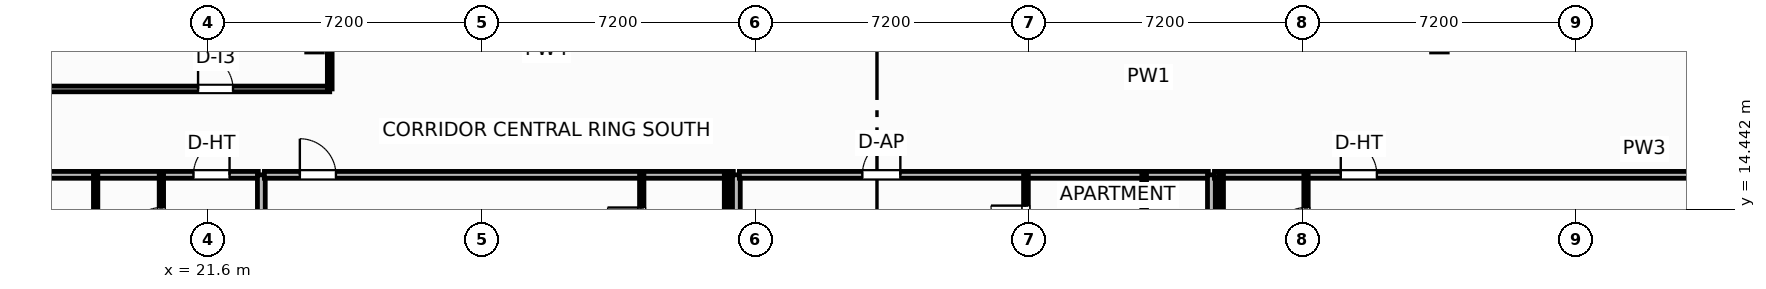
"""IFC4 building model, lengths in metres.
Left out: names, types, materials, properties, quantities, classifications, styles, units other than length and angle.
Written with IfcOpenShell. Run it as: python <this file> out.ifc"""

import sys

from ifc_helpers import new_model, si_unit, direction, frame, frame_2d, origin, place, context, subcontext, project, spatial, rectangle, extrude, element, fill, save


model = new_model("IFC4")
c1 = context("Model", 3, precision=1e-05, world=origin(), true_north=direction((0.0, 1.0)))
c2 = subcontext(c1, "Body", "Model", "MODEL_VIEW")
j1 = project(units=[si_unit("LENGTHUNIT", "METRE"), si_unit("PLANEANGLEUNIT", "RADIAN")], contexts=[c1])
p1 = place(None, origin())
s1 = spatial("IfcSite", under=j1, at=p1, CompositionType="ELEMENT")
p2 = place(p1, origin())
s2 = spatial("IfcBuilding", under=s1, at=p2, CompositionType="ELEMENT")
p3 = place(p2, frame((0.0, 0.0, 223.8)))
s3 = spatial("IfcBuildingStorey", under=s2, at=p3, CompositionType="ELEMENT", Elevation=223.8)
p4 = place(p3, frame((56.219, 9.845, 0.0), z_axis=(0.0, 0.0, 1.0), x_axis=(0.935225601791, 0.354052360188, 0.0)))
e1 = element("IfcWall", 1, at=p4, inside=s3, PredefinedType="SOLIDWALL", context=c2, shape_type="SweptSolid", body=[
    extrude(rectangle(XDim=17.647, YDim=0.22, at=frame_2d((8.824, 0.0))), origin(), (0.0, 0.0, 1.0), 2.73),
])
p5 = place(p4, frame((7.774, 0.0, 0.8)))
e2 = element("IfcOpeningElement", 2, at=p5, cuts=e1, PredefinedType="OPENING", context=c2, shape_type="SweptSolid", body=[
    extrude(rectangle(XDim=2.1, YDim=1.75, at=frame_2d((1.05, 0.875))), frame((0.0, 0.12, 0.0), z_axis=(0.0, -1.0, 0.0), x_axis=(1.0, 0.0, 0.0)), (0.0, 0.0, 1.0), 0.24),
])
p6 = place(p3, frame((6.908, 17.61, 0.0), z_axis=(0.0, 0.0, 1.0), x_axis=(1.0, 0.0, 0.0)))
e3 = element("IfcWall", 3, at=p6, inside=s3, PredefinedType="PARTITIONING", context=c2, shape_type="SweptSolid", body=[
    extrude(rectangle(XDim=17.892, YDim=0.15, at=frame_2d((8.946, 0.0))), origin(), (0.0, 0.0, 1.0), 3.45),
])
p7 = place(p6, frame((14.427, 0.0, 0.0)))
e4 = element("IfcOpeningElement", 4, at=p7, cuts=e3, PredefinedType="OPENING", context=c2, shape_type="SweptSolid", body=[
    extrude(rectangle(XDim=0.92, YDim=2.05, at=frame_2d((0.46, 1.025))), frame((0.0, 0.085, 0.0), z_axis=(0.0, -1.0, 0.0), x_axis=(1.0, 0.0, 0.0)), (0.0, 0.0, 1.0), 0.17),
])
p8 = place(p3, frame((24.8, 17.61, 0.0), z_axis=(0.0, 0.0, 1.0), x_axis=(0.0, 1.0, 0.0)))
e5 = element("IfcWall", 5, at=p8, inside=s3, PredefinedType="PARTITIONING", context=c2, shape_type="SweptSolid", body=[
    extrude(rectangle(XDim=1.63, YDim=0.125, at=frame_2d((0.815, 0.0))), origin(), (0.0, 0.0, 1.0), 2.739),
])
p9 = place(p3, frame((7.764, 15.35, 0.0), z_axis=(0.0, 0.0, 1.0), x_axis=(1.0, 0.0, 0.0)))
e6 = element("IfcWall", 6, at=p9, inside=s3, PredefinedType="PARTITIONING", context=c2, shape_type="SweptSolid", body=[
    extrude(rectangle(XDim=15.156, YDim=0.18, at=frame_2d((7.578, 0.0))), origin(), (0.0, 0.0, 1.0), 3.45),
])
p10 = place(p9, frame((13.45, 0.0, 0.0)))
e7 = element("IfcOpeningElement", 7, at=p10, cuts=e6, PredefinedType="OPENING", context=c2, shape_type="SweptSolid", body=[
    extrude(rectangle(XDim=0.95, YDim=2.15, at=frame_2d((0.475, 1.075))), frame((0.0, 0.1, 0.0), z_axis=(0.0, -1.0, 0.0), x_axis=(1.0, 0.0, 0.0)), (0.0, 0.0, 1.0), 0.2),
])
p11 = place(p3, frame((20.37, 12.83, 0.0), z_axis=(0.0, 0.0, 1.0), x_axis=(0.0, 1.0, 0.0)))
e8 = element("IfcWall", 8, at=p11, inside=s3, PredefinedType="PARTITIONING", context=c2, shape_type="SweptSolid", body=[
    extrude(rectangle(XDim=2.52, YDim=0.115, at=frame_2d((1.26, 0.0))), origin(), (0.0, 0.0, 1.0), 3.45),
])
p12 = place(p11, frame((0.76, 0.0, 0.0)))
e9 = element("IfcOpeningElement", 9, at=p12, cuts=e8, PredefinedType="OPENING", context=c2, shape_type="SweptSolid", body=[
    extrude(rectangle(XDim=0.9, YDim=2.05, at=frame_2d((0.45, 1.025))), frame((0.0, 0.067, 0.0), z_axis=(0.0, -1.0, 0.0), x_axis=(1.0, 0.0, 0.0)), (0.0, 0.0, 1.0), 0.135),
])
p13 = place(p3, frame((18.64, 12.83, 0.0), z_axis=(0.0, 0.0, 1.0), x_axis=(0.0, 1.0, 0.0)))
e10 = element("IfcWall", 10, at=p13, inside=s3, PredefinedType="PARTITIONING", context=c2, shape_type="SweptSolid", body=[
    extrude(rectangle(XDim=2.52, YDim=0.115, at=frame_2d((1.26, 0.0))), origin(), (0.0, 0.0, 1.0), 3.45),
])
p14 = place(p3, frame((23.0, -2.71, 0.0), z_axis=(0.0, 0.0, 1.0), x_axis=(0.0, 1.0, 0.0)))
e11 = element("IfcWall", 11, at=p14, inside=s3, PredefinedType="PARTITIONING", context=c2, shape_type="SweptSolid", body=[
    extrude(rectangle(XDim=18.06, YDim=0.205, at=frame_2d((9.03, 0.0))), origin(), (0.0, 0.0, 1.0), 3.45),
])
p15 = place(p3, frame((23.08, 15.35, 0.0), z_axis=(0.0, 0.0, 1.0), x_axis=(1.0, 0.0, 0.0)))
e12 = element("IfcWall", 12, at=p15, inside=s3, PredefinedType="PARTITIONING", context=c2, shape_type="SweptSolid", body=[
    extrude(rectangle(XDim=12.34, YDim=0.18, at=frame_2d((6.17, 0.0))), origin(), (0.0, 0.0, 1.0), 3.45),
])
p16 = place(p15, frame((0.933, 0.0, 0.0)))
e13 = element("IfcOpeningElement", 13, at=p16, cuts=e12, PredefinedType="OPENING", context=c2, shape_type="SweptSolid", body=[
    extrude(rectangle(XDim=0.95, YDim=2.15, at=frame_2d((0.475, 1.075))), frame((0.0, 0.1, 0.0), z_axis=(0.0, -1.0, 0.0), x_axis=(1.0, 0.0, 0.0)), (0.0, 0.0, 1.0), 0.2),
])
p17 = place(p3, frame((33.01, 12.83, 0.0), z_axis=(0.0, 0.0, 1.0), x_axis=(0.0, 1.0, 0.0)))
e14 = element("IfcWall", 14, at=p17, inside=s3, PredefinedType="PARTITIONING", context=c2, shape_type="SweptSolid", body=[
    extrude(rectangle(XDim=2.52, YDim=0.115, at=frame_2d((1.26, 0.0))), origin(), (0.0, 0.0, 1.0), 3.45),
])
p18 = place(p17, frame((0.76, 0.0, 0.0)))
e15 = element("IfcOpeningElement", 15, at=p18, cuts=e14, PredefinedType="OPENING", context=c2, shape_type="SweptSolid", body=[
    extrude(rectangle(XDim=0.9, YDim=2.05, at=frame_2d((0.45, 1.025))), frame((0.0, 0.067, 0.0), z_axis=(0.0, -1.0, 0.0), x_axis=(1.0, 0.0, 0.0)), (0.0, 0.0, 1.0), 0.135),
])
p19 = place(p3, frame((35.24, 12.83, 0.0), z_axis=(0.0, 0.0, 1.0), x_axis=(0.0, 1.0, 0.0)))
e16 = element("IfcWall", 16, at=p19, inside=s3, PredefinedType="PARTITIONING", context=c2, shape_type="SweptSolid", body=[
    extrude(rectangle(XDim=2.52, YDim=0.115, at=frame_2d((1.26, 0.0))), origin(), (0.0, 0.0, 1.0), 2.739),
])
p20 = place(p3, frame((35.5, 2.022, 0.0), z_axis=(0.0, 0.0, 1.0), x_axis=(0.0, 1.0, 0.0)))
e17 = element("IfcWall", 17, at=p20, inside=s3, PredefinedType="PARTITIONING", context=c2, shape_type="SweptSolid", body=[
    extrude(rectangle(XDim=13.328, YDim=0.205, at=frame_2d((6.664, 0.0))), origin(), (0.0, 0.0, 1.0), 2.739),
])
p21 = place(p3, frame((35.58, 15.35, 0.0), z_axis=(0.0, 0.0, 1.0), x_axis=(1.0, 0.0, 0.0)))
e18 = element("IfcWall", 18, at=p21, inside=s3, PredefinedType="PARTITIONING", context=c2, shape_type="SweptSolid", body=[
    extrude(rectangle(XDim=12.34, YDim=0.18, at=frame_2d((6.17, 0.0))), origin(), (0.0, 0.0, 1.0), 3.45),
])
p22 = place(p21, frame((3.235, 0.0, 0.0)))
e19 = element("IfcOpeningElement", 19, at=p22, cuts=e18, PredefinedType="OPENING", context=c2, shape_type="SweptSolid", body=[
    extrude(rectangle(XDim=1.0, YDim=2.2, at=frame_2d((0.5, 1.1))), frame((0.0, 0.1, 0.0), z_axis=(0.0, -1.0, 0.0), x_axis=(1.0, 0.0, 0.0)), (0.0, 0.0, 1.0), 0.2),
])
p23 = place(p3, frame((43.12, 4.907, 0.0), z_axis=(0.0, 0.0, 1.0), x_axis=(0.0, 1.0, 0.0)))
e20 = element("IfcWall", 20, at=p23, inside=s3, PredefinedType="PARTITIONING", context=c2, shape_type="SweptSolid", body=[
    extrude(rectangle(XDim=10.443, YDim=0.125, at=frame_2d((5.222, 0.0))), origin(), (0.0, 0.0, 1.0), 3.45),
])
p24 = place(p23, frame((2.32, 0.0, 0.0)))
e21 = element("IfcOpeningElement", 21, at=p24, cuts=e20, PredefinedType="OPENING", context=c2, shape_type="SweptSolid", body=[
    extrude(rectangle(XDim=0.92, YDim=2.05, at=frame_2d((0.46, 1.025))), frame((0.0, 0.073, 0.0), z_axis=(0.0, -1.0, 0.0), x_axis=(1.0, 0.0, 0.0)), (0.0, 0.0, 1.0), 0.145),
])
p25 = place(p23, frame((6.42, 0.0, 0.0)))
e22 = element("IfcOpeningElement", 22, at=p25, cuts=e20, PredefinedType="OPENING", context=c2, shape_type="SweptSolid", body=[
    extrude(rectangle(XDim=0.9, YDim=2.05, at=frame_2d((0.45, 1.025))), frame((0.0, 0.073, 0.0), z_axis=(0.0, -1.0, 0.0), x_axis=(1.0, 0.0, 0.0)), (0.0, 0.0, 1.0), 0.145),
])
p26 = place(p23, frame((8.713, 0.0, 0.0)))
e23 = element("IfcOpeningElement", 23, at=p26, cuts=e20, PredefinedType="OPENING", context=c2, shape_type="SweptSolid", body=[
    extrude(rectangle(XDim=0.92, YDim=2.05, at=frame_2d((0.46, 1.025))), frame((0.0, 0.073, 0.0), z_axis=(0.0, -1.0, 0.0), x_axis=(1.0, 0.0, 0.0)), (0.0, 0.0, 1.0), 0.145),
])
p27 = place(p3, frame((46.23, 12.94, 0.0), z_axis=(0.0, 0.0, 1.0), x_axis=(0.0, 1.0, 0.0)))
e24 = element("IfcWall", 24, at=p27, inside=s3, PredefinedType="PARTITIONING", context=c2, shape_type="SweptSolid", body=[
    extrude(rectangle(XDim=2.41, YDim=0.125, at=frame_2d((1.205, 0.0))), origin(), (0.0, 0.0, 1.0), 3.45),
])
p28 = place(p3, frame((48.0, 6.754, 0.0), z_axis=(0.0, 0.0, 1.0), x_axis=(0.0, 1.0, 0.0)))
e25 = element("IfcWall", 25, at=p28, inside=s3, PredefinedType="PARTITIONING", context=c2, shape_type="SweptSolid", body=[
    extrude(rectangle(XDim=8.596, YDim=0.205, at=frame_2d((4.298, 0.0))), origin(), (0.0, 0.0, 1.0), 3.45),
])
p29 = place(p3, frame((48.08, 15.35, 0.0), z_axis=(0.0, 0.0, 1.0), x_axis=(1.0, 0.0, 0.0)))
e26 = element("IfcWall", 26, at=p29, inside=s3, PredefinedType="PARTITIONING", context=c2, shape_type="SweptSolid", body=[
    extrude(rectangle(XDim=22.624, YDim=0.18, at=frame_2d((11.312, 0.0))), origin(), (0.0, 0.0, 1.0), 3.45),
])
p30 = place(p29, frame((3.324, 0.0, 0.0)))
e27 = element("IfcOpeningElement", 27, at=p30, cuts=e26, PredefinedType="OPENING", context=c2, shape_type="SweptSolid", body=[
    extrude(rectangle(XDim=0.95, YDim=2.15, at=frame_2d((0.475, 1.075))), frame((0.0, 0.1, 0.0), z_axis=(0.0, -1.0, 0.0), x_axis=(1.0, 0.0, 0.0)), (0.0, 0.0, 1.0), 0.2),
])
p31 = place(p3, frame((50.49, 12.83, 0.0), z_axis=(0.0, 0.0, 1.0), x_axis=(0.0, 1.0, 0.0)))
e28 = element("IfcWall", 28, at=p31, inside=s3, PredefinedType="PARTITIONING", context=c2, shape_type="SweptSolid", body=[
    extrude(rectangle(XDim=2.52, YDim=0.115, at=frame_2d((1.26, 0.0))), origin(), (0.0, 0.0, 1.0), 3.45),
])
p32 = place(p31, frame((0.76, 0.0, 0.0)))
e29 = element("IfcOpeningElement", 29, at=p32, cuts=e28, PredefinedType="OPENING", context=c2, shape_type="SweptSolid", body=[
    extrude(rectangle(XDim=0.9, YDim=2.05, at=frame_2d((0.45, 1.025))), frame((0.0, 0.067, 0.0), z_axis=(0.0, -1.0, 0.0), x_axis=(1.0, 0.0, 0.0)), (0.0, 0.0, 1.0), 0.135),
])
p33 = place(p3, frame((48.26, 12.83, 0.0), z_axis=(0.0, 0.0, 1.0), x_axis=(0.0, 1.0, 0.0)))
e30 = element("IfcWall", 30, at=p33, inside=s3, PredefinedType="PARTITIONING", context=c2, shape_type="SweptSolid", body=[
    extrude(rectangle(XDim=2.52, YDim=0.115, at=frame_2d((1.26, 0.0))), origin(), (0.0, 0.0, 1.0), 3.45),
])
p34 = place(p7, origin())
e31 = element("IfcDoor", 31, at=p34, inside=s3, OperationType="SINGLE_SWING_LEFT", PredefinedType="DOOR", context=c2, shape_type="SweptSolid", body=[
    extrude(rectangle(XDim=0.92, YDim=2.05, at=frame_2d((0.46, 1.025))), frame((0.0, 0.025, 0.0), z_axis=(0.0, -1.0, 0.0), x_axis=(1.0, 0.0, 0.0)), (0.0, 0.0, 1.0), 0.05),
])
fill(e4, e31)
p35 = place(p10, origin())
e32 = element("IfcDoor", 32, at=p35, inside=s3, OperationType="SINGLE_SWING_RIGHT", PredefinedType="DOOR", context=c2, shape_type="SweptSolid", body=[
    extrude(rectangle(XDim=0.95, YDim=2.15, at=frame_2d((0.475, 1.075))), frame((0.0, 0.025, 0.0), z_axis=(0.0, -1.0, 0.0), x_axis=(1.0, 0.0, 0.0)), (0.0, 0.0, 1.0), 0.05),
])
fill(e7, e32)
p36 = place(p12, origin())
e33 = element("IfcDoor", 33, at=p36, inside=s3, OperationType="SINGLE_SWING_LEFT", PredefinedType="DOOR", context=c2, shape_type="SweptSolid", body=[
    extrude(rectangle(XDim=0.9, YDim=2.05, at=frame_2d((0.45, 1.025))), frame((0.0, 0.025, 0.0), z_axis=(0.0, -1.0, 0.0), x_axis=(1.0, 0.0, 0.0)), (0.0, 0.0, 1.0), 0.05),
])
fill(e9, e33)
p37 = place(p16, origin())
e34 = element("IfcDoor", 34, at=p37, inside=s3, OperationType="SINGLE_SWING_LEFT", PredefinedType="DOOR", context=c2, shape_type="SweptSolid", body=[
    extrude(rectangle(XDim=0.95, YDim=2.15, at=frame_2d((0.475, 1.075))), frame((0.0, 0.025, 0.0), z_axis=(0.0, -1.0, 0.0), x_axis=(1.0, 0.0, 0.0)), (0.0, 0.0, 1.0), 0.05),
])
fill(e13, e34)
p38 = place(p18, origin())
e35 = element("IfcDoor", 35, at=p38, inside=s3, OperationType="SINGLE_SWING_RIGHT", PredefinedType="DOOR", context=c2, shape_type="SweptSolid", body=[
    extrude(rectangle(XDim=0.9, YDim=2.05, at=frame_2d((0.45, 1.025))), frame((0.0, 0.025, 0.0), z_axis=(0.0, -1.0, 0.0), x_axis=(1.0, 0.0, 0.0)), (0.0, 0.0, 1.0), 0.05),
])
fill(e15, e35)
p39 = place(p22, origin())
e36 = element("IfcDoor", 36, at=p39, inside=s3, OperationType="SINGLE_SWING_RIGHT", PredefinedType="DOOR", context=c2, shape_type="SweptSolid", body=[
    extrude(rectangle(XDim=1.0, YDim=2.2, at=frame_2d((0.5, 1.1))), frame((0.0, 0.025, 0.0), z_axis=(0.0, -1.0, 0.0), x_axis=(1.0, 0.0, 0.0)), (0.0, 0.0, 1.0), 0.05),
])
fill(e19, e36)
p40 = place(p26, origin())
e37 = element("IfcDoor", 37, at=p40, inside=s3, OperationType="SINGLE_SWING_RIGHT", PredefinedType="DOOR", context=c2, shape_type="SweptSolid", body=[
    extrude(rectangle(XDim=0.92, YDim=2.05, at=frame_2d((0.46, 1.025))), frame((0.0, 0.025, 0.0), z_axis=(0.0, -1.0, 0.0), x_axis=(1.0, 0.0, 0.0)), (0.0, 0.0, 1.0), 0.05),
])
fill(e23, e37)
p41 = place(p30, origin())
e38 = element("IfcDoor", 38, at=p41, inside=s3, OperationType="SINGLE_SWING_LEFT", PredefinedType="DOOR", context=c2, shape_type="SweptSolid", body=[
    extrude(rectangle(XDim=0.95, YDim=2.15, at=frame_2d((0.475, 1.075))), frame((0.0, 0.025, 0.0), z_axis=(0.0, -1.0, 0.0), x_axis=(1.0, 0.0, 0.0)), (0.0, 0.0, 1.0), 0.05),
])
fill(e27, e38)
p42 = place(p32, origin())
e39 = element("IfcDoor", 39, at=p42, inside=s3, OperationType="SINGLE_SWING_LEFT", PredefinedType="DOOR", context=c2, shape_type="SweptSolid", body=[
    extrude(rectangle(XDim=0.9, YDim=2.05, at=frame_2d((0.45, 1.025))), frame((0.0, 0.025, 0.0), z_axis=(0.0, -1.0, 0.0), x_axis=(1.0, 0.0, 0.0)), (0.0, 0.0, 1.0), 0.05),
])
fill(e29, e39)
save(model, sys.argv[1])
